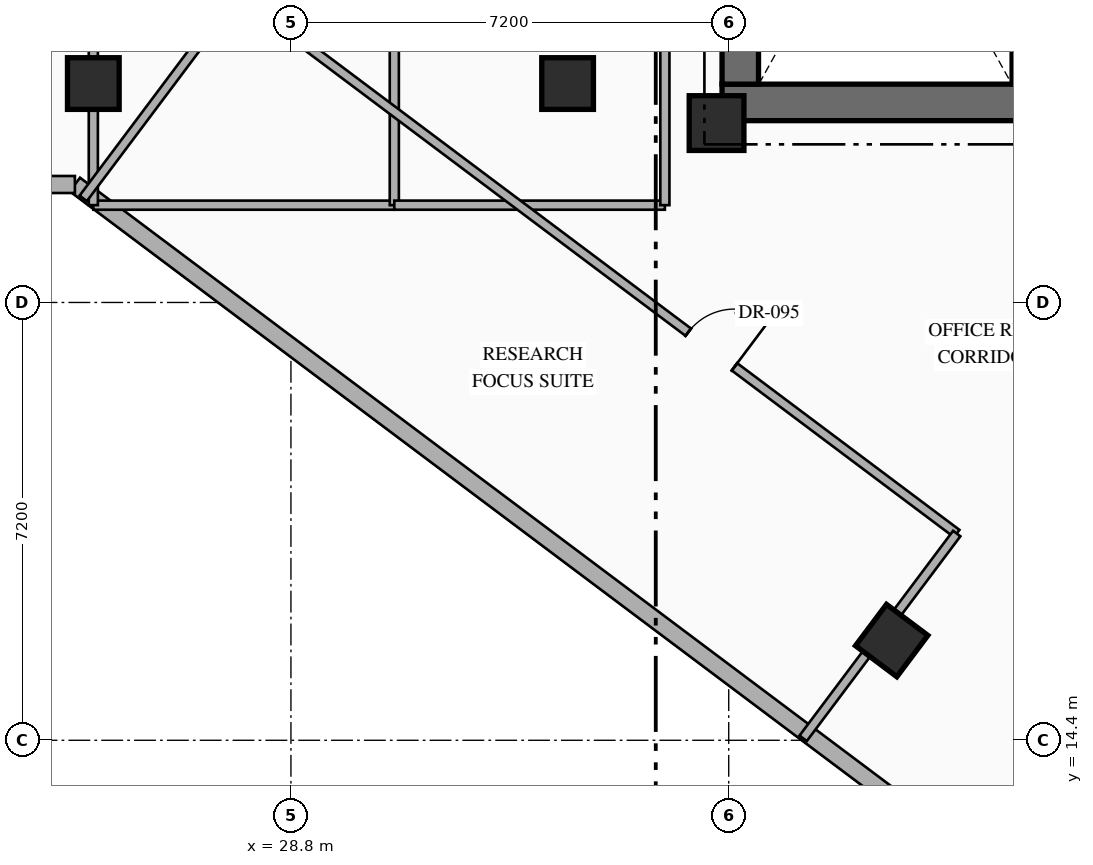
"""IFC4 building model, lengths in metres.
Left out: names, types, materials, properties, quantities, classifications, styles, units other than length and angle.
Written with IfcOpenShell. Run it as: python <this file> out.ifc"""

import sys

from ifc_helpers import new_model, si_unit, direction, frame, frame_2d, origin, origin_2d, place, context, subcontext, project, spatial, rectangle, hollow_rectangle, extrude, element, fill, save


model = new_model("IFC4")
c1 = context("Model", 3, precision=1e-05, world=origin(), true_north=direction((0.0, 1.0)))
c2 = subcontext(c1, "Body", "Model", "MODEL_VIEW")
j1 = project(units=[si_unit("LENGTHUNIT", "METRE"), si_unit("PLANEANGLEUNIT", "RADIAN")], contexts=[c1])
p1 = place(None, origin())
s1 = spatial("IfcSite", under=j1, at=p1, CompositionType="ELEMENT")
p2 = place(p1, origin())
s2 = spatial("IfcBuilding", under=s1, at=p2, CompositionType="ELEMENT")
p3 = place(p2, frame((0.0, 0.0, 142.05)))
s3 = spatial("IfcBuildingStorey", under=s2, at=p3, CompositionType="ELEMENT", Elevation=142.05)
p4 = place(p3, frame((35.89, 24.89, 0.0), z_axis=(0.0, 0.0, 1.0), x_axis=(1.0, 0.0, 0.0)))
e1 = element("IfcWall", 1, at=p4, inside=s3, PredefinedType="SHEAR", context=c2, shape_type="SweptSolid", body=[
    extrude(rectangle(XDim=7.76, YDim=0.6, at=frame_2d((3.88, 0.0))), origin(), (0.0, 0.0, 1.0), 3.6),
])
p5 = place(p3, frame((36.19, 25.19, 0.0), z_axis=(0.0, 0.0, 1.0), x_axis=(0.0, 1.0, 0.0)))
e2 = element("IfcWall", 2, at=p5, inside=s3, PredefinedType="SHEAR", context=c2, shape_type="SweptSolid", body=[
    extrude(rectangle(XDim=9.48, YDim=0.6, at=frame_2d((4.74, 0.0))), origin(), (0.0, 0.0, 1.0), 3.6),
])
p6 = place(p3, frame((40.81, 25.19, 0.0), z_axis=(0.0, 0.0, 1.0), x_axis=(0.0, 1.0, 0.0)))
e3 = element("IfcWall", 3, at=p6, inside=s3, PredefinedType="SHEAR", context=c2, shape_type="SweptSolid", body=[
    extrude(rectangle(XDim=9.48, YDim=0.3, at=frame_2d((4.74, 0.0))), origin(), (0.0, 0.0, 1.0), 3.6),
])
p7 = place(p3, frame((35.8, 24.55, 0.0), z_axis=(0.0, 0.0, 1.0), x_axis=(1.0, 0.0, 0.0)))
e4 = element("IfcColumn", 4, at=p7, inside=s3, PredefinedType="COLUMN", context=c2, shape_type="SweptSolid", body=[
    extrude(rectangle(XDim=0.9, YDim=0.9, at=origin_2d()), origin(), (0.0, 0.0, 1.0), 3.6),
])
for number, where, z_axis, x_axis in (
    (5, (25.55, 25.2, 0.0), (0.0, 0.0, 1.0), (1.0, 0.0, 0.0)),
    (6, (33.35, 25.2, 0.0), (0.0, 0.0, 1.0), (1.0, 0.0, 0.0)),
    (7, (38.68, 16.04, 0.0), (0.0, 0.0, 1.0), (0.8, -0.6, 0.0)),
):
    element("IfcColumn", number, at=place(p3, frame(where, z_axis=z_axis, x_axis=x_axis)), inside=s3, PredefinedType="COLUMN", context=c2, shape_type="SweptSolid", body=[
        extrude(hollow_rectangle(XDim=0.85, YDim=0.85, WallThickness=0.032, at=origin_2d()), origin(), (0.0, 0.0, 1.0), 3.6),
    ])
p8 = place(p3, frame((44.918, 8.787, 0.0), z_axis=(0.0, 0.0, 1.0), x_axis=(-0.800004765927, 0.599993645378, 0.0)))
e8 = element("IfcWall", 8, at=p8, inside=s3, PredefinedType="STANDARD", context=c2, shape_type="SweptSolid", body=[
    extrude(rectangle(XDim=24.588, YDim=0.28, at=frame_2d((12.294, 0.0))), origin(), (0.0, 0.0, 1.0), 3.35),
])
p9 = place(p3, frame((25.247, 23.54, 0.0), z_axis=(0.0, 0.0, 1.0), x_axis=(-1.0, 0.0, 0.0)))
e9 = element("IfcWall", 9, at=p9, inside=s3, PredefinedType="STANDARD", context=c2, shape_type="SweptSolid", body=[
    extrude(rectangle(XDim=6.747, YDim=0.28, at=frame_2d((3.374, 0.0))), origin(), (0.0, 0.0, 1.0), 3.35),
])
p10 = place(p3, frame((25.55, 23.2, 0.0), z_axis=(0.0, 0.0, 1.0), x_axis=(1.0, 0.0, 0.0)))
e10 = element("IfcWall", 10, at=p10, inside=s3, PredefinedType="PARTITIONING", context=c2, shape_type="SweptSolid", body=[
    extrude(rectangle(XDim=4.95, YDim=0.15, at=frame_2d((2.475, 0.0))), origin(), (0.0, 0.0, 1.0), 3.35),
])
p11 = place(p3, frame((25.55, 23.2, 0.0), z_axis=(0.0, 0.0, 1.0), x_axis=(0.0, 1.0, 0.0)))
e11 = element("IfcWall", 11, at=p11, inside=s3, PredefinedType="PARTITIONING", context=c2, shape_type="SweptSolid", body=[
    extrude(rectangle(XDim=7.15, YDim=0.15, at=frame_2d((3.575, 0.0))), origin(), (0.0, 0.0, 1.0), 2.695),
])
p12 = place(p3, frame((30.5, 23.2, 0.0), z_axis=(0.0, 0.0, 1.0), x_axis=(0.0, 1.0, 0.0)))
e12 = element("IfcWall", 12, at=p12, inside=s3, PredefinedType="PARTITIONING", context=c2, shape_type="SweptSolid", body=[
    extrude(rectangle(XDim=7.15, YDim=0.15, at=frame_2d((3.575, 0.0))), origin(), (0.0, 0.0, 1.0), 3.35),
])
p13 = place(p3, frame((30.5, 23.2, 0.0), z_axis=(0.0, 0.0, 1.0), x_axis=(1.0, 0.0, 0.0)))
e13 = element("IfcWall", 13, at=p13, inside=s3, PredefinedType="PARTITIONING", context=c2, shape_type="SweptSolid", body=[
    extrude(rectangle(XDim=4.45, YDim=0.15, at=frame_2d((2.225, 0.0))), origin(), (0.0, 0.0, 1.0), 3.35),
])
p14 = place(p3, frame((34.95, 23.2, 0.0), z_axis=(0.0, 0.0, 1.0), x_axis=(0.0, 1.0, 0.0)))
e14 = element("IfcWall", 14, at=p14, inside=s3, PredefinedType="PARTITIONING", context=c2, shape_type="SweptSolid", body=[
    extrude(rectangle(XDim=7.15, YDim=0.15, at=frame_2d((3.575, 0.0))), origin(), (0.0, 0.0, 1.0), 3.35),
])
p15 = place(p3, frame((27.91, 26.68, 0.0), z_axis=(0.0, 0.0, 1.0), x_axis=(0.800005938517, -0.599992081896, 0.0)))
e15 = element("IfcWall", 15, at=p15, inside=s3, PredefinedType="PARTITIONING", context=c2, shape_type="SweptSolid", body=[
    extrude(rectangle(XDim=14.8, YDim=0.15, at=frame_2d((7.4, 0.0))), origin(), (0.0, 0.0, 1.0), 3.35),
])
p16 = place(p15, frame((9.281, 0.0, 0.0)))
e16 = element("IfcOpeningElement", 16, at=p16, cuts=e15, PredefinedType="OPENING", context=c2, shape_type="SweptSolid", body=[
    extrude(rectangle(XDim=0.95, YDim=2.15, at=frame_2d((0.475, 1.075))), frame((0.0, 0.085, 0.0), z_axis=(0.0, -1.0, 0.0), x_axis=(1.0, 0.0, 0.0)), (0.0, 0.0, 1.0), 0.17),
])
p17 = place(p3, frame((25.384, 23.312, 0.0), z_axis=(0.0, 0.0, 1.0), x_axis=(0.599990721155, 0.80000695905, 0.0)))
e17 = element("IfcWall", 17, at=p17, inside=s3, PredefinedType="PARTITIONING", context=c2, shape_type="SweptSolid", body=[
    extrude(rectangle(XDim=4.21, YDim=0.15, at=frame_2d((2.105, 0.0))), origin(), (0.0, 0.0, 1.0), 3.35),
])
p18 = place(p3, frame((37.224, 14.432, 0.0), z_axis=(0.0, 0.0, 1.0), x_axis=(0.599962885857, 0.800027834262, 0.0)))
e18 = element("IfcWall", 18, at=p18, inside=s3, PredefinedType="PARTITIONING", context=c2, shape_type="SweptSolid", body=[
    extrude(rectangle(XDim=4.21, YDim=0.15, at=frame_2d((2.105, 0.0))), origin(), (0.0, 0.0, 1.0), 2.695),
])
p19 = place(p16, origin())
e19 = element("IfcDoor", 19, at=p19, inside=s3, OperationType="SINGLE_SWING_RIGHT", PredefinedType="DOOR", context=c2, shape_type="SweptSolid", body=[
    extrude(rectangle(XDim=0.95, YDim=2.15, at=frame_2d((0.475, 1.075))), frame((0.0, 0.025, 0.0), z_axis=(0.0, -1.0, 0.0), x_axis=(1.0, 0.0, 0.0)), (0.0, 0.0, 1.0), 0.05),
])
fill(e16, e19)
save(model, sys.argv[1])
